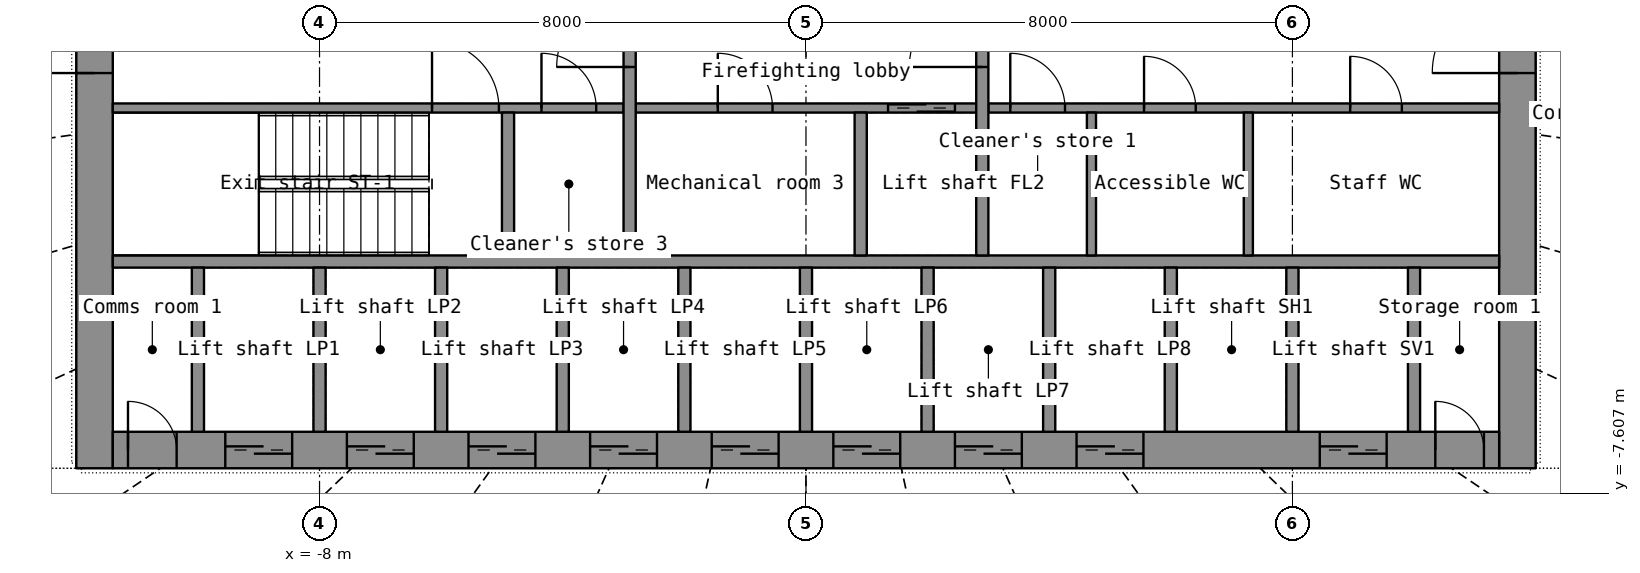
"""IFC4 building model, lengths in metres.
Left out: names, types, materials, properties, quantities, classifications, styles, units other than length and angle.
Written with IfcOpenShell. Run it as: python <this file> out.ifc"""

import sys

from ifc_helpers import new_model, si_unit, direction, frame, frame_2d, origin, place, context, subcontext, project, spatial, rectangle, extrude, element, fill, save


model = new_model("IFC4")
c1 = context("Model", 3, precision=1e-05, world=origin(), true_north=direction((0.0, 1.0)))
c2 = subcontext(c1, "Body", "Model", "MODEL_VIEW")
j1 = project(units=[si_unit("LENGTHUNIT", "METRE"), si_unit("PLANEANGLEUNIT", "RADIAN")], contexts=[c1])
p1 = place(None, origin())
s1 = spatial("IfcSite", under=j1, at=p1, CompositionType="ELEMENT")
p2 = place(p1, origin())
s2 = spatial("IfcBuilding", under=s1, at=p2, CompositionType="ELEMENT")
p3 = place(p2, frame((0.0, 0.0, 59.3)))
s3 = spatial("IfcBuildingStorey", under=s2, at=p3, CompositionType="ELEMENT", Elevation=59.3)
p4 = place(p3, frame((-11.7, -7.2, 0.0), z_axis=(0.0, 0.0, 1.0), x_axis=(0.0, 1.0, 0.0)))
e1 = element("IfcWall", 1, at=p4, inside=s3, PredefinedType="SHEAR", context=c2, shape_type="SweptSolid", body=[
    extrude(rectangle(XDim=14.4, YDim=0.6, at=frame_2d((7.2, 0.0))), origin(), (0.0, 0.0, 1.0), 3.3),
])
p5 = place(p4, frame((6.5, 0.0, 0.0)))
e2 = element("IfcOpeningElement", 2, at=p5, cuts=e1, PredefinedType="OPENING", context=c2, shape_type="SweptSolid", body=[
    extrude(rectangle(XDim=1.4, YDim=2.2, at=frame_2d((0.7, 1.1))), frame((0.0, 0.31, 0.0), z_axis=(0.0, -1.0, 0.0), x_axis=(1.0, 0.0, 0.0)), (0.0, 0.0, 1.0), 0.62),
])
p6 = place(p3, frame((11.7, -7.2, 0.0), z_axis=(0.0, 0.0, 1.0), x_axis=(0.0, 1.0, 0.0)))
e3 = element("IfcWall", 3, at=p6, inside=s3, PredefinedType="SHEAR", context=c2, shape_type="SweptSolid", body=[
    extrude(rectangle(XDim=14.4, YDim=0.6, at=frame_2d((7.2, 0.0))), origin(), (0.0, 0.0, 1.0), 3.3),
])
p7 = place(p6, frame((6.5, 0.0, 0.0)))
e4 = element("IfcOpeningElement", 4, at=p7, cuts=e3, PredefinedType="OPENING", context=c2, shape_type="SweptSolid", body=[
    extrude(rectangle(XDim=1.4, YDim=2.2, at=frame_2d((0.7, 1.1))), frame((0.0, 0.31, 0.0), z_axis=(0.0, -1.0, 0.0), x_axis=(1.0, 0.0, 0.0)), (0.0, 0.0, 1.0), 0.62),
])
p8 = place(p3, frame((-11.4, -6.9, 0.0), z_axis=(0.0, 0.0, 1.0), x_axis=(1.0, 0.0, 0.0)))
e5 = element("IfcWall", 5, at=p8, inside=s3, PredefinedType="SHEAR", context=c2, shape_type="SweptSolid", body=[
    extrude(rectangle(XDim=22.8, YDim=0.6, at=frame_2d((11.4, 0.0))), origin(), (0.0, 0.0, 1.0), 3.3),
])
p9 = place(p8, frame((1.85, 0.0, 0.0)))
e6 = element("IfcOpeningElement", 6, at=p9, cuts=e5, PredefinedType="OPENING", context=c2, shape_type="SweptSolid", body=[
    extrude(rectangle(XDim=1.1, YDim=2.2, at=frame_2d((0.55, 1.1))), frame((0.0, 0.31, 0.0), z_axis=(0.0, -1.0, 0.0), x_axis=(1.0, 0.0, 0.0)), (0.0, 0.0, 1.0), 0.62),
])
p10 = place(p8, frame((3.85, 0.0, 0.0)))
e7 = element("IfcOpeningElement", 7, at=p10, cuts=e5, PredefinedType="OPENING", context=c2, shape_type="SweptSolid", body=[
    extrude(rectangle(XDim=1.1, YDim=2.2, at=frame_2d((0.55, 1.1))), frame((0.0, 0.31, 0.0), z_axis=(0.0, -1.0, 0.0), x_axis=(1.0, 0.0, 0.0)), (0.0, 0.0, 1.0), 0.62),
])
p11 = place(p8, frame((5.85, 0.0, 0.0)))
e8 = element("IfcOpeningElement", 8, at=p11, cuts=e5, PredefinedType="OPENING", context=c2, shape_type="SweptSolid", body=[
    extrude(rectangle(XDim=1.1, YDim=2.2, at=frame_2d((0.55, 1.1))), frame((0.0, 0.31, 0.0), z_axis=(0.0, -1.0, 0.0), x_axis=(1.0, 0.0, 0.0)), (0.0, 0.0, 1.0), 0.62),
])
p12 = place(p8, frame((7.85, 0.0, 0.0)))
e9 = element("IfcOpeningElement", 9, at=p12, cuts=e5, PredefinedType="OPENING", context=c2, shape_type="SweptSolid", body=[
    extrude(rectangle(XDim=1.1, YDim=2.2, at=frame_2d((0.55, 1.1))), frame((0.0, 0.31, 0.0), z_axis=(0.0, -1.0, 0.0), x_axis=(1.0, 0.0, 0.0)), (0.0, 0.0, 1.0), 0.62),
])
p13 = place(p8, frame((9.85, 0.0, 0.0)))
e10 = element("IfcOpeningElement", 10, at=p13, cuts=e5, PredefinedType="OPENING", context=c2, shape_type="SweptSolid", body=[
    extrude(rectangle(XDim=1.1, YDim=2.2, at=frame_2d((0.55, 1.1))), frame((0.0, 0.31, 0.0), z_axis=(0.0, -1.0, 0.0), x_axis=(1.0, 0.0, 0.0)), (0.0, 0.0, 1.0), 0.62),
])
p14 = place(p8, frame((11.85, 0.0, 0.0)))
e11 = element("IfcOpeningElement", 11, at=p14, cuts=e5, PredefinedType="OPENING", context=c2, shape_type="SweptSolid", body=[
    extrude(rectangle(XDim=1.1, YDim=2.2, at=frame_2d((0.55, 1.1))), frame((0.0, 0.31, 0.0), z_axis=(0.0, -1.0, 0.0), x_axis=(1.0, 0.0, 0.0)), (0.0, 0.0, 1.0), 0.62),
])
p15 = place(p8, frame((13.85, 0.0, 0.0)))
e12 = element("IfcOpeningElement", 12, at=p15, cuts=e5, PredefinedType="OPENING", context=c2, shape_type="SweptSolid", body=[
    extrude(rectangle(XDim=1.1, YDim=2.2, at=frame_2d((0.55, 1.1))), frame((0.0, 0.31, 0.0), z_axis=(0.0, -1.0, 0.0), x_axis=(1.0, 0.0, 0.0)), (0.0, 0.0, 1.0), 0.62),
])
p16 = place(p8, frame((15.85, 0.0, 0.0)))
e13 = element("IfcOpeningElement", 13, at=p16, cuts=e5, PredefinedType="OPENING", context=c2, shape_type="SweptSolid", body=[
    extrude(rectangle(XDim=1.1, YDim=2.2, at=frame_2d((0.55, 1.1))), frame((0.0, 0.31, 0.0), z_axis=(0.0, -1.0, 0.0), x_axis=(1.0, 0.0, 0.0)), (0.0, 0.0, 1.0), 0.62),
])
p17 = place(p8, frame((19.85, 0.0, 0.0)))
e14 = element("IfcOpeningElement", 14, at=p17, cuts=e5, PredefinedType="OPENING", context=c2, shape_type="SweptSolid", body=[
    extrude(rectangle(XDim=1.1, YDim=2.2, at=frame_2d((0.55, 1.1))), frame((0.0, 0.31, 0.0), z_axis=(0.0, -1.0, 0.0), x_axis=(1.0, 0.0, 0.0)), (0.0, 0.0, 1.0), 0.62),
])
p18 = place(p8, frame((0.25, 0.0, 0.0)))
e15 = element("IfcOpeningElement", 15, at=p18, cuts=e5, PredefinedType="OPENING", context=c2, shape_type="SweptSolid", body=[
    extrude(rectangle(XDim=0.8, YDim=2.05, at=frame_2d((0.4, 1.025))), frame((0.0, 0.31, 0.0), z_axis=(0.0, -1.0, 0.0), x_axis=(1.0, 0.0, 0.0)), (0.0, 0.0, 1.0), 0.62),
])
p19 = place(p8, frame((21.75, 0.0, 0.0)))
e16 = element("IfcOpeningElement", 16, at=p19, cuts=e5, PredefinedType="OPENING", context=c2, shape_type="SweptSolid", body=[
    extrude(rectangle(XDim=0.8, YDim=2.05, at=frame_2d((0.4, 1.025))), frame((0.0, 0.31, 0.0), z_axis=(0.0, -1.0, 0.0), x_axis=(1.0, 0.0, 0.0)), (0.0, 0.0, 1.0), 0.62),
])
p20 = place(p3, frame((-11.4, -3.8, 0.0), z_axis=(0.0, 0.0, 1.0), x_axis=(1.0, 0.0, 0.0)))
e17 = element("IfcWall", 17, at=p20, inside=s3, PredefinedType="SHEAR", context=c2, shape_type="SweptSolid", body=[
    extrude(rectangle(XDim=22.8, YDim=0.2, at=frame_2d((11.4, 0.0))), origin(), (0.0, 0.0, 1.0), 3.3),
])
for number, where, z_axis, x_axis in (
    (18, (-10.0, -6.6, 0.0), (0.0, 0.0, 1.0), (0.0, 1.0, 0.0)),
    (19, (-8.0, -6.6, 0.0), (0.0, 0.0, 1.0), (0.0, 1.0, 0.0)),
    (20, (-6.0, -6.6, 0.0), (0.0, 0.0, 1.0), (0.0, 1.0, 0.0)),
    (21, (-4.0, -6.6, 0.0), (0.0, 0.0, 1.0), (0.0, 1.0, 0.0)),
    (22, (-2.0, -6.6, 0.0), (0.0, 0.0, 1.0), (0.0, 1.0, 0.0)),
    (23, (0.0, -6.6, 0.0), (0.0, 0.0, 1.0), (0.0, 1.0, 0.0)),
    (24, (2.0, -6.6, 0.0), (0.0, 0.0, 1.0), (0.0, 1.0, 0.0)),
    (25, (4.0, -6.6, 0.0), (0.0, 0.0, 1.0), (0.0, 1.0, 0.0)),
    (26, (6.0, -6.6, 0.0), (0.0, 0.0, 1.0), (0.0, 1.0, 0.0)),
    (27, (8.0, -6.6, 0.0), (0.0, 0.0, 1.0), (0.0, 1.0, 0.0)),
    (28, (10.0, -6.6, 0.0), (0.0, 0.0, 1.0), (0.0, 1.0, 0.0)),
):
    element("IfcWall", number, at=place(p3, frame(where, z_axis=z_axis, x_axis=x_axis)), inside=s3, PredefinedType="SHEAR", context=c2, shape_type="SweptSolid", body=[
        extrude(rectangle(XDim=2.7, YDim=0.2, at=frame_2d((1.35, 0.0))), origin(), (0.0, 0.0, 1.0), 3.3),
    ])
p21 = place(p3, frame((-11.4, -1.275, 0.0), z_axis=(0.0, 0.0, 1.0), x_axis=(1.0, 0.0, 0.0)))
e29 = element("IfcWall", 29, at=p21, inside=s3, PredefinedType="SHEAR", context=c2, shape_type="SweptSolid", body=[
    extrude(rectangle(XDim=8.4, YDim=0.15, at=frame_2d((4.2, 0.0))), origin(), (0.0, 0.0, 1.0), 3.3),
])
p22 = place(p21, frame((5.25, 0.0, 0.0)))
e30 = element("IfcOpeningElement", 30, at=p22, cuts=e29, PredefinedType="OPENING", context=c2, shape_type="SweptSolid", body=[
    extrude(rectangle(XDim=1.1, YDim=2.15, at=frame_2d((0.55, 1.075))), frame((0.0, 0.085, 0.0), z_axis=(0.0, -1.0, 0.0), x_axis=(1.0, 0.0, 0.0)), (0.0, 0.0, 1.0), 0.17),
])
p23 = place(p21, frame((7.05, 0.0, 0.0)))
e31 = element("IfcOpeningElement", 31, at=p23, cuts=e29, PredefinedType="OPENING", context=c2, shape_type="SweptSolid", body=[
    extrude(rectangle(XDim=0.9, YDim=2.1, at=frame_2d((0.45, 1.05))), frame((0.0, 0.085, 0.0), z_axis=(0.0, -1.0, 0.0), x_axis=(1.0, 0.0, 0.0)), (0.0, 0.0, 1.0), 0.17),
])
p24 = place(p3, frame((-2.8, -1.275, 0.0), z_axis=(0.0, 0.0, 1.0), x_axis=(1.0, 0.0, 0.0)))
e32 = element("IfcWall", 32, at=p24, inside=s3, PredefinedType="SHEAR", context=c2, shape_type="SweptSolid", body=[
    extrude(rectangle(XDim=5.6, YDim=0.15, at=frame_2d((2.8, 0.0))), origin(), (0.0, 0.0, 1.0), 3.3),
])
p25 = place(p24, frame((4.15, 0.0, 0.0)))
e33 = element("IfcOpeningElement", 33, at=p25, cuts=e32, PredefinedType="OPENING", context=c2, shape_type="SweptSolid", body=[
    extrude(rectangle(XDim=1.1, YDim=2.2, at=frame_2d((0.55, 1.1))), frame((0.0, 0.085, 0.0), z_axis=(0.0, -1.0, 0.0), x_axis=(1.0, 0.0, 0.0)), (0.0, 0.0, 1.0), 0.17),
])
p26 = place(p24, frame((1.35, 0.0, 0.0)))
e34 = element("IfcOpeningElement", 34, at=p26, cuts=e32, PredefinedType="OPENING", context=c2, shape_type="SweptSolid", body=[
    extrude(rectangle(XDim=0.9, YDim=2.1, at=frame_2d((0.45, 1.05))), frame((0.0, 0.085, 0.0), z_axis=(0.0, -1.0, 0.0), x_axis=(1.0, 0.0, 0.0)), (0.0, 0.0, 1.0), 0.17),
])
p27 = place(p3, frame((3.0, -1.275, 0.0), z_axis=(0.0, 0.0, 1.0), x_axis=(1.0, 0.0, 0.0)))
e35 = element("IfcWall", 35, at=p27, inside=s3, PredefinedType="PARTITIONING", context=c2, shape_type="SweptSolid", body=[
    extrude(rectangle(XDim=8.4, YDim=0.15, at=frame_2d((4.2, 0.0))), origin(), (0.0, 0.0, 1.0), 3.3),
])
p28 = place(p27, frame((0.36, 0.0, 0.0)))
e36 = element("IfcOpeningElement", 36, at=p28, cuts=e35, PredefinedType="OPENING", context=c2, shape_type="SweptSolid", body=[
    extrude(rectangle(XDim=0.9, YDim=2.1, at=frame_2d((0.45, 1.05))), frame((0.0, 0.085, 0.0), z_axis=(0.0, -1.0, 0.0), x_axis=(1.0, 0.0, 0.0)), (0.0, 0.0, 1.0), 0.17),
])
p29 = place(p27, frame((2.56, 0.0, 0.0)))
e37 = element("IfcOpeningElement", 37, at=p29, cuts=e35, PredefinedType="OPENING", context=c2, shape_type="SweptSolid", body=[
    extrude(rectangle(XDim=0.85, YDim=2.1, at=frame_2d((0.425, 1.05))), frame((0.0, 0.085, 0.0), z_axis=(0.0, -1.0, 0.0), x_axis=(1.0, 0.0, 0.0)), (0.0, 0.0, 1.0), 0.17),
])
p30 = place(p27, frame((5.95, 0.0, 0.0)))
e38 = element("IfcOpeningElement", 38, at=p30, cuts=e35, PredefinedType="OPENING", context=c2, shape_type="SweptSolid", body=[
    extrude(rectangle(XDim=0.85, YDim=2.1, at=frame_2d((0.425, 1.05))), frame((0.0, 0.085, 0.0), z_axis=(0.0, -1.0, 0.0), x_axis=(1.0, 0.0, 0.0)), (0.0, 0.0, 1.0), 0.17),
])
p31 = place(p3, frame((-2.9, -3.7, 0.0), z_axis=(0.0, 0.0, 1.0), x_axis=(0.0, 1.0, 0.0)))
e39 = element("IfcWall", 39, at=p31, inside=s3, PredefinedType="SHEAR", context=c2, shape_type="SweptSolid", body=[
    extrude(rectangle(XDim=7.4, YDim=0.2, at=frame_2d((3.7, 0.0))), origin(), (0.0, 0.0, 1.0), 3.3),
])
p32 = place(p31, frame((3.1, 0.0, 0.0)))
e40 = element("IfcOpeningElement", 40, at=p32, cuts=e39, PredefinedType="OPENING", context=c2, shape_type="SweptSolid", body=[
    extrude(rectangle(XDim=1.2, YDim=2.2, at=frame_2d((0.6, 1.1))), frame((0.0, 0.11, 0.0), z_axis=(0.0, -1.0, 0.0), x_axis=(1.0, 0.0, 0.0)), (0.0, 0.0, 1.0), 0.22),
])
p33 = place(p3, frame((2.9, -3.7, 0.0), z_axis=(0.0, 0.0, 1.0), x_axis=(0.0, 1.0, 0.0)))
e41 = element("IfcWall", 41, at=p33, inside=s3, PredefinedType="SHEAR", context=c2, shape_type="SweptSolid", body=[
    extrude(rectangle(XDim=7.4, YDim=0.2, at=frame_2d((3.7, 0.0))), origin(), (0.0, 0.0, 1.0), 3.3),
])
p34 = place(p33, frame((3.1, 0.0, 0.0)))
e42 = element("IfcOpeningElement", 42, at=p34, cuts=e41, PredefinedType="OPENING", context=c2, shape_type="SweptSolid", body=[
    extrude(rectangle(XDim=1.2, YDim=2.2, at=frame_2d((0.6, 1.1))), frame((0.0, 0.11, 0.0), z_axis=(0.0, -1.0, 0.0), x_axis=(1.0, 0.0, 0.0)), (0.0, 0.0, 1.0), 0.22),
])
for number, where, z_axis, x_axis in (
    (43, (0.9, -3.7, 0.0), (0.0, 0.0, 1.0), (0.0, 1.0, 0.0)),
    (44, (-4.9, -3.7, 0.0), (0.0, 0.0, 1.0), (0.0, 1.0, 0.0)),
):
    element("IfcWall", number, at=place(p3, frame(where, z_axis=z_axis, x_axis=x_axis)), inside=s3, PredefinedType="SHEAR", context=c2, shape_type="SweptSolid", body=[
        extrude(rectangle(XDim=2.35, YDim=0.2, at=frame_2d((1.175, 0.0))), origin(), (0.0, 0.0, 1.0), 3.3),
    ])
for number, where, z_axis, x_axis in (
    (45, (4.695, -3.7, 0.0), (0.0, 0.0, 1.0), (0.0, 1.0, 0.0)),
    (46, (7.275, -3.7, 0.0), (0.0, 0.0, 1.0), (0.0, 1.0, 0.0)),
):
    element("IfcWall", number, at=place(p3, frame(where, z_axis=z_axis, x_axis=x_axis)), inside=s3, PredefinedType="PARTITIONING", context=c2, shape_type="SweptSolid", body=[
        extrude(rectangle(XDim=2.35, YDim=0.15, at=frame_2d((1.175, 0.0))), origin(), (0.0, 0.0, 1.0), 3.3),
    ])
p35 = place(p9, origin())
e47 = element("IfcDoor", 47, at=p35, inside=s3, OperationType="DOUBLE_DOOR_SLIDING", PredefinedType="DOOR", context=c2, shape_type="SweptSolid", body=[
    extrude(rectangle(XDim=1.1, YDim=2.2, at=frame_2d((0.55, 1.1))), frame((0.0, 0.025, 0.0), z_axis=(0.0, -1.0, 0.0), x_axis=(1.0, 0.0, 0.0)), (0.0, 0.0, 1.0), 0.05),
])
fill(e6, e47)
p36 = place(p10, origin())
e48 = element("IfcDoor", 48, at=p36, inside=s3, OperationType="DOUBLE_DOOR_SLIDING", PredefinedType="DOOR", context=c2, shape_type="SweptSolid", body=[
    extrude(rectangle(XDim=1.1, YDim=2.2, at=frame_2d((0.55, 1.1))), frame((0.0, 0.025, 0.0), z_axis=(0.0, -1.0, 0.0), x_axis=(1.0, 0.0, 0.0)), (0.0, 0.0, 1.0), 0.05),
])
fill(e7, e48)
p37 = place(p11, origin())
e49 = element("IfcDoor", 49, at=p37, inside=s3, OperationType="DOUBLE_DOOR_SLIDING", PredefinedType="DOOR", context=c2, shape_type="SweptSolid", body=[
    extrude(rectangle(XDim=1.1, YDim=2.2, at=frame_2d((0.55, 1.1))), frame((0.0, 0.025, 0.0), z_axis=(0.0, -1.0, 0.0), x_axis=(1.0, 0.0, 0.0)), (0.0, 0.0, 1.0), 0.05),
])
fill(e8, e49)
p38 = place(p12, origin())
e50 = element("IfcDoor", 50, at=p38, inside=s3, OperationType="DOUBLE_DOOR_SLIDING", PredefinedType="DOOR", context=c2, shape_type="SweptSolid", body=[
    extrude(rectangle(XDim=1.1, YDim=2.2, at=frame_2d((0.55, 1.1))), frame((0.0, 0.025, 0.0), z_axis=(0.0, -1.0, 0.0), x_axis=(1.0, 0.0, 0.0)), (0.0, 0.0, 1.0), 0.05),
])
fill(e9, e50)
p39 = place(p13, origin())
e51 = element("IfcDoor", 51, at=p39, inside=s3, OperationType="DOUBLE_DOOR_SLIDING", PredefinedType="DOOR", context=c2, shape_type="SweptSolid", body=[
    extrude(rectangle(XDim=1.1, YDim=2.2, at=frame_2d((0.55, 1.1))), frame((0.0, 0.025, 0.0), z_axis=(0.0, -1.0, 0.0), x_axis=(1.0, 0.0, 0.0)), (0.0, 0.0, 1.0), 0.05),
])
fill(e10, e51)
p40 = place(p14, origin())
e52 = element("IfcDoor", 52, at=p40, inside=s3, OperationType="DOUBLE_DOOR_SLIDING", PredefinedType="DOOR", context=c2, shape_type="SweptSolid", body=[
    extrude(rectangle(XDim=1.1, YDim=2.2, at=frame_2d((0.55, 1.1))), frame((0.0, 0.025, 0.0), z_axis=(0.0, -1.0, 0.0), x_axis=(1.0, 0.0, 0.0)), (0.0, 0.0, 1.0), 0.05),
])
fill(e11, e52)
p41 = place(p15, origin())
e53 = element("IfcDoor", 53, at=p41, inside=s3, OperationType="DOUBLE_DOOR_SLIDING", PredefinedType="DOOR", context=c2, shape_type="SweptSolid", body=[
    extrude(rectangle(XDim=1.1, YDim=2.2, at=frame_2d((0.55, 1.1))), frame((0.0, 0.025, 0.0), z_axis=(0.0, -1.0, 0.0), x_axis=(1.0, 0.0, 0.0)), (0.0, 0.0, 1.0), 0.05),
])
fill(e12, e53)
p42 = place(p16, origin())
e54 = element("IfcDoor", 54, at=p42, inside=s3, OperationType="DOUBLE_DOOR_SLIDING", PredefinedType="DOOR", context=c2, shape_type="SweptSolid", body=[
    extrude(rectangle(XDim=1.1, YDim=2.2, at=frame_2d((0.55, 1.1))), frame((0.0, 0.025, 0.0), z_axis=(0.0, -1.0, 0.0), x_axis=(1.0, 0.0, 0.0)), (0.0, 0.0, 1.0), 0.05),
])
fill(e13, e54)
p43 = place(p17, origin())
e55 = element("IfcDoor", 55, at=p43, inside=s3, OperationType="DOUBLE_DOOR_SLIDING", PredefinedType="DOOR", context=c2, shape_type="SweptSolid", body=[
    extrude(rectangle(XDim=1.1, YDim=2.2, at=frame_2d((0.55, 1.1))), frame((0.0, 0.025, 0.0), z_axis=(0.0, -1.0, 0.0), x_axis=(1.0, 0.0, 0.0)), (0.0, 0.0, 1.0), 0.05),
])
fill(e14, e55)
p44 = place(p18, origin())
e56 = element("IfcDoor", 56, at=p44, inside=s3, OperationType="SINGLE_SWING_LEFT", PredefinedType="DOOR", context=c2, shape_type="SweptSolid", body=[
    extrude(rectangle(XDim=0.8, YDim=2.05, at=frame_2d((0.4, 1.025))), frame((0.0, 0.025, 0.0), z_axis=(0.0, -1.0, 0.0), x_axis=(1.0, 0.0, 0.0)), (0.0, 0.0, 1.0), 0.05),
])
fill(e15, e56)
p45 = place(p19, origin())
e57 = element("IfcDoor", 57, at=p45, inside=s3, OperationType="SINGLE_SWING_LEFT", PredefinedType="DOOR", context=c2, shape_type="SweptSolid", body=[
    extrude(rectangle(XDim=0.8, YDim=2.05, at=frame_2d((0.4, 1.025))), frame((0.0, 0.025, 0.0), z_axis=(0.0, -1.0, 0.0), x_axis=(1.0, 0.0, 0.0)), (0.0, 0.0, 1.0), 0.05),
])
fill(e16, e57)
p46 = place(p5, origin())
e58 = element("IfcDoor", 58, at=p46, inside=s3, OperationType="DOUBLE_DOOR_SINGLE_SWING", PredefinedType="DOOR", context=c2, shape_type="SweptSolid", body=[
    extrude(rectangle(XDim=1.4, YDim=2.2, at=frame_2d((0.7, 1.1))), frame((0.0, 0.025, 0.0), z_axis=(0.0, -1.0, 0.0), x_axis=(1.0, 0.0, 0.0)), (0.0, 0.0, 1.0), 0.05),
])
fill(e2, e58)
p47 = place(p7, origin())
e59 = element("IfcDoor", 59, at=p47, inside=s3, OperationType="DOUBLE_DOOR_SINGLE_SWING", PredefinedType="DOOR", context=c2, shape_type="SweptSolid", body=[
    extrude(rectangle(XDim=1.4, YDim=2.2, at=frame_2d((0.7, 1.1))), frame((0.0, 0.025, 0.0), z_axis=(0.0, -1.0, 0.0), x_axis=(1.0, 0.0, 0.0)), (0.0, 0.0, 1.0), 0.05),
])
fill(e4, e59)
p48 = place(p32, origin())
e60 = element("IfcDoor", 60, at=p48, inside=s3, OperationType="SINGLE_SWING_LEFT", PredefinedType="DOOR", context=c2, shape_type="SweptSolid", body=[
    extrude(rectangle(XDim=1.2, YDim=2.2, at=frame_2d((0.6, 1.1))), frame((0.0, 0.025, 0.0), z_axis=(0.0, -1.0, 0.0), x_axis=(1.0, 0.0, 0.0)), (0.0, 0.0, 1.0), 0.05),
])
fill(e40, e60)
p49 = place(p34, origin())
e61 = element("IfcDoor", 61, at=p49, inside=s3, OperationType="SINGLE_SWING_LEFT", PredefinedType="DOOR", context=c2, shape_type="SweptSolid", body=[
    extrude(rectangle(XDim=1.2, YDim=2.2, at=frame_2d((0.6, 1.1))), frame((0.0, 0.025, 0.0), z_axis=(0.0, -1.0, 0.0), x_axis=(1.0, 0.0, 0.0)), (0.0, 0.0, 1.0), 0.05),
])
fill(e42, e61)
p50 = place(p25, origin())
e62 = element("IfcDoor", 62, at=p50, inside=s3, OperationType="DOUBLE_DOOR_SLIDING", PredefinedType="DOOR", context=c2, shape_type="SweptSolid", body=[
    extrude(rectangle(XDim=1.1, YDim=2.2, at=frame_2d((0.55, 1.1))), frame((0.0, 0.025, 0.0), z_axis=(0.0, -1.0, 0.0), x_axis=(1.0, 0.0, 0.0)), (0.0, 0.0, 1.0), 0.05),
])
fill(e33, e62)
p51 = place(p22, origin())
e63 = element("IfcDoor", 63, at=p51, inside=s3, OperationType="SINGLE_SWING_LEFT", PredefinedType="DOOR", context=c2, shape_type="SweptSolid", body=[
    extrude(rectangle(XDim=1.1, YDim=2.15, at=frame_2d((0.55, 1.075))), frame((0.0, 0.025, 0.0), z_axis=(0.0, -1.0, 0.0), x_axis=(1.0, 0.0, 0.0)), (0.0, 0.0, 1.0), 0.05),
])
fill(e30, e63)
p52 = place(p28, origin())
e64 = element("IfcDoor", 64, at=p52, inside=s3, OperationType="SINGLE_SWING_LEFT", PredefinedType="DOOR", context=c2, shape_type="SweptSolid", body=[
    extrude(rectangle(XDim=0.9, YDim=2.1, at=frame_2d((0.45, 1.05))), frame((0.0, 0.025, 0.0), z_axis=(0.0, -1.0, 0.0), x_axis=(1.0, 0.0, 0.0)), (0.0, 0.0, 1.0), 0.05),
])
fill(e36, e64)
p53 = place(p29, origin())
e65 = element("IfcDoor", 65, at=p53, inside=s3, OperationType="SINGLE_SWING_LEFT", PredefinedType="DOOR", context=c2, shape_type="SweptSolid", body=[
    extrude(rectangle(XDim=0.85, YDim=2.1, at=frame_2d((0.425, 1.05))), frame((0.0, 0.025, 0.0), z_axis=(0.0, -1.0, 0.0), x_axis=(1.0, 0.0, 0.0)), (0.0, 0.0, 1.0), 0.05),
])
fill(e37, e65)
p54 = place(p30, origin())
e66 = element("IfcDoor", 66, at=p54, inside=s3, OperationType="SINGLE_SWING_LEFT", PredefinedType="DOOR", context=c2, shape_type="SweptSolid", body=[
    extrude(rectangle(XDim=0.85, YDim=2.1, at=frame_2d((0.425, 1.05))), frame((0.0, 0.025, 0.0), z_axis=(0.0, -1.0, 0.0), x_axis=(1.0, 0.0, 0.0)), (0.0, 0.0, 1.0), 0.05),
])
fill(e38, e66)
p55 = place(p26, origin())
e67 = element("IfcDoor", 67, at=p55, inside=s3, OperationType="SINGLE_SWING_LEFT", PredefinedType="DOOR", context=c2, shape_type="SweptSolid", body=[
    extrude(rectangle(XDim=0.9, YDim=2.1, at=frame_2d((0.45, 1.05))), frame((0.0, 0.025, 0.0), z_axis=(0.0, -1.0, 0.0), x_axis=(1.0, 0.0, 0.0)), (0.0, 0.0, 1.0), 0.05),
])
fill(e34, e67)
p56 = place(p23, origin())
e68 = element("IfcDoor", 68, at=p56, inside=s3, OperationType="SINGLE_SWING_LEFT", PredefinedType="DOOR", context=c2, shape_type="SweptSolid", body=[
    extrude(rectangle(XDim=0.9, YDim=2.1, at=frame_2d((0.45, 1.05))), frame((0.0, 0.025, 0.0), z_axis=(0.0, -1.0, 0.0), x_axis=(1.0, 0.0, 0.0)), (0.0, 0.0, 1.0), 0.05),
])
fill(e31, e68)
save(model, sys.argv[1])
